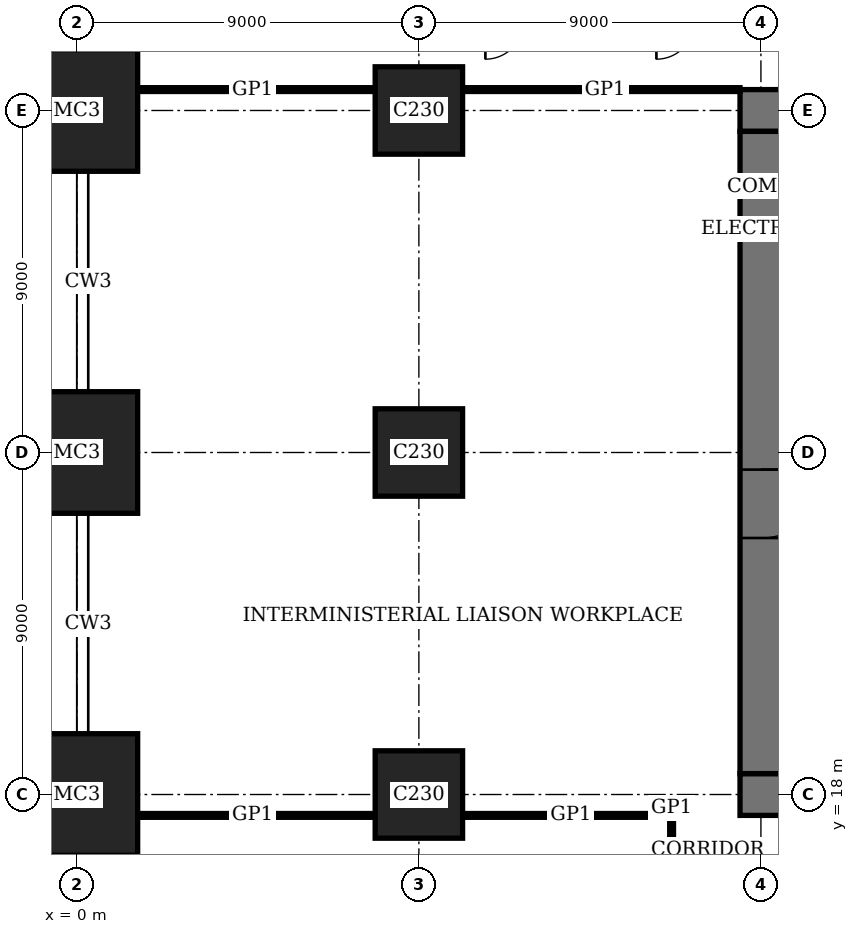
"""IFC4 building model, lengths in metres.
Left out: names, types, materials, properties, quantities, classifications, styles, units other than length and angle.
Written with IfcOpenShell. Run it as: python <this file> out.ifc"""

import sys

from ifc_helpers import new_model, si_unit, direction, frame, frame_2d, origin, origin_2d, place, context, subcontext, project, spatial, rectangle, extrude, element, fill, save


model = new_model("IFC4")
c1 = context("Model", 3, precision=1e-05, world=origin(), true_north=direction((0.0, 1.0)))
c2 = subcontext(c1, "Body", "Model", "MODEL_VIEW")
j1 = project(units=[si_unit("LENGTHUNIT", "METRE"), si_unit("PLANEANGLEUNIT", "RADIAN")], contexts=[c1])
p1 = place(None, origin())
s1 = spatial("IfcSite", under=j1, at=p1, CompositionType="ELEMENT")
p2 = place(p1, origin())
s2 = spatial("IfcBuilding", under=s1, at=p2, CompositionType="ELEMENT")
p3 = place(p2, frame((0.0, 0.0, 85.0)))
s3 = spatial("IfcBuildingStorey", under=s2, at=p3, CompositionType="ELEMENT", Elevation=85.0)
for number, where, z_axis, x_axis in (
    (1, (0.0, 18.0, 0.0), (0.0, 0.0, 1.0), (1.0, 0.0, 0.0)),
    (2, (0.0, 27.0, 0.0), (0.0, 0.0, 1.0), (1.0, 0.0, 0.0)),
    (3, (0.0, 36.0, 0.0), (0.0, 0.0, 1.0), (1.0, 0.0, 0.0)),
):
    element("IfcColumn", number, at=place(p3, frame(where, z_axis=z_axis, x_axis=x_axis)), inside=s3, PredefinedType="COLUMN", context=c2, shape_type="SweptSolid", body=[
        extrude(rectangle(XDim=3.2, YDim=3.2, at=origin_2d()), origin(), (0.0, 0.0, 1.0), 4.0),
    ])
for number, where, z_axis, x_axis in (
    (4, (9.0, 18.0, 0.0), (0.0, 0.0, 1.0), (1.0, 0.0, 0.0)),
    (5, (9.0, 27.0, 0.0), (0.0, 0.0, 1.0), (1.0, 0.0, 0.0)),
    (6, (9.0, 36.0, 0.0), (0.0, 0.0, 1.0), (1.0, 0.0, 0.0)),
):
    element("IfcColumn", number, at=place(p3, frame(where, z_axis=z_axis, x_axis=x_axis)), inside=s3, PredefinedType="COLUMN", context=c2, shape_type="SweptSolid", body=[
        extrude(rectangle(XDim=2.3, YDim=2.3, at=origin_2d()), origin(), (0.0, 0.0, 1.0), 4.0),
    ])
p4 = place(p3, frame((17.45, 18.0, 0.0), z_axis=(0.0, 0.0, 1.0), x_axis=(1.0, 0.0, 0.0)))
e7 = element("IfcWall", 7, at=p4, inside=s3, PredefinedType="SHEAR", context=c2, shape_type="SweptSolid", body=[
    extrude(rectangle(XDim=28.1, YDim=1.1, at=frame_2d((14.05, 0.0))), origin(), (0.0, 0.0, 1.0), 4.0),
])
p5 = place(p4, frame((11.55, 0.0, 0.0)))
e8 = element("IfcOpeningElement", 8, at=p5, cuts=e7, PredefinedType="OPENING", context=c2, shape_type="SweptSolid", body=[
    extrude(rectangle(XDim=1.0, YDim=2.4, at=frame_2d((0.5, 1.2))), frame((0.0, 0.56, 0.0), z_axis=(0.0, -1.0, 0.0), x_axis=(1.0, 0.0, 0.0)), (0.0, 0.0, 1.0), 1.12),
])
p6 = place(p4, frame((16.55, 0.0, 0.0)))
e9 = element("IfcOpeningElement", 9, at=p6, cuts=e7, PredefinedType="OPENING", context=c2, shape_type="SweptSolid", body=[
    extrude(rectangle(XDim=1.0, YDim=2.4, at=frame_2d((0.5, 1.2))), frame((0.0, 0.56, 0.0), z_axis=(0.0, -1.0, 0.0), x_axis=(1.0, 0.0, 0.0)), (0.0, 0.0, 1.0), 1.12),
])
p7 = place(p4, frame((20.0, 0.0, 0.0)))
e10 = element("IfcOpeningElement", 10, at=p7, cuts=e7, PredefinedType="OPENING", context=c2, shape_type="SweptSolid", body=[
    extrude(rectangle(XDim=1.1, YDim=2.4, at=frame_2d((0.55, 1.2))), frame((0.0, 0.56, 0.0), z_axis=(0.0, -1.0, 0.0), x_axis=(1.0, 0.0, 0.0)), (0.0, 0.0, 1.0), 1.12),
])
p8 = place(p4, frame((24.05, 0.0, 0.0)))
e11 = element("IfcOpeningElement", 11, at=p8, cuts=e7, PredefinedType="OPENING", context=c2, shape_type="SweptSolid", body=[
    extrude(rectangle(XDim=1.0, YDim=2.4, at=frame_2d((0.5, 1.2))), frame((0.0, 0.56, 0.0), z_axis=(0.0, -1.0, 0.0), x_axis=(1.0, 0.0, 0.0)), (0.0, 0.0, 1.0), 1.12),
])
p9 = place(p3, frame((45.55, 36.0, 0.0), z_axis=(0.0, 0.0, 1.0), x_axis=(-1.0, 0.0, 0.0)))
e12 = element("IfcWall", 12, at=p9, inside=s3, PredefinedType="SHEAR", context=c2, shape_type="SweptSolid", body=[
    extrude(rectangle(XDim=28.1, YDim=1.1, at=frame_2d((14.05, 0.0))), origin(), (0.0, 0.0, 1.0), 4.0),
])
p10 = place(p9, frame((11.55, 0.0, 0.0)))
e13 = element("IfcOpeningElement", 13, at=p10, cuts=e12, PredefinedType="OPENING", context=c2, shape_type="SweptSolid", body=[
    extrude(rectangle(XDim=1.0, YDim=2.4, at=frame_2d((0.5, 1.2))), frame((0.0, 0.56, 0.0), z_axis=(0.0, -1.0, 0.0), x_axis=(1.0, 0.0, 0.0)), (0.0, 0.0, 1.0), 1.12),
])
p11 = place(p9, frame((16.55, 0.0, 0.0)))
e14 = element("IfcOpeningElement", 14, at=p11, cuts=e12, PredefinedType="OPENING", context=c2, shape_type="SweptSolid", body=[
    extrude(rectangle(XDim=1.0, YDim=2.4, at=frame_2d((0.5, 1.2))), frame((0.0, 0.56, 0.0), z_axis=(0.0, -1.0, 0.0), x_axis=(1.0, 0.0, 0.0)), (0.0, 0.0, 1.0), 1.12),
])
p12 = place(p9, frame((20.0, 0.0, 0.0)))
e15 = element("IfcOpeningElement", 15, at=p12, cuts=e12, PredefinedType="OPENING", context=c2, shape_type="SweptSolid", body=[
    extrude(rectangle(XDim=1.1, YDim=2.4, at=frame_2d((0.55, 1.2))), frame((0.0, 0.56, 0.0), z_axis=(0.0, -1.0, 0.0), x_axis=(1.0, 0.0, 0.0)), (0.0, 0.0, 1.0), 1.12),
])
p13 = place(p9, frame((24.05, 0.0, 0.0)))
e16 = element("IfcOpeningElement", 16, at=p13, cuts=e12, PredefinedType="OPENING", context=c2, shape_type="SweptSolid", body=[
    extrude(rectangle(XDim=1.0, YDim=2.4, at=frame_2d((0.5, 1.2))), frame((0.0, 0.56, 0.0), z_axis=(0.0, -1.0, 0.0), x_axis=(1.0, 0.0, 0.0)), (0.0, 0.0, 1.0), 1.12),
])
p14 = place(p3, frame((18.0, 35.45, 0.0), z_axis=(0.0, 0.0, 1.0), x_axis=(0.0, -1.0, 0.0)))
e17 = element("IfcWall", 17, at=p14, inside=s3, PredefinedType="SHEAR", context=c2, shape_type="SweptSolid", body=[
    extrude(rectangle(XDim=16.9, YDim=1.1, at=frame_2d((8.45, 0.0))), origin(), (0.0, 0.0, 1.0), 4.0),
])
p15 = place(p14, frame((8.9, 0.0, 0.0)))
e18 = element("IfcOpeningElement", 18, at=p15, cuts=e17, PredefinedType="OPENING", context=c2, shape_type="SweptSolid", body=[
    extrude(rectangle(XDim=1.8, YDim=2.4, at=frame_2d((0.9, 1.2))), frame((0.0, 0.56, 0.0), z_axis=(0.0, -1.0, 0.0), x_axis=(1.0, 0.0, 0.0)), (0.0, 0.0, 1.0), 1.12),
])
p16 = place(p3, frame((1.6, 17.45, 0.0), z_axis=(0.0, 0.0, 1.0), x_axis=(1.0, 0.0, 0.0)))
e19 = element("IfcWall", 19, at=p16, inside=s3, PredefinedType="PARTITIONING", context=c2, shape_type="SweptSolid", body=[
    extrude(rectangle(XDim=6.25, YDim=0.1, at=frame_2d((3.125, 0.0))), origin(), (0.0, 0.0, 1.0), 3.75),
])
p17 = place(p3, frame((10.15, 17.45, 0.0), z_axis=(0.0, 0.0, 1.0), x_axis=(1.0, 0.0, 0.0)))
e20 = element("IfcWall", 20, at=p17, inside=s3, PredefinedType="PARTITIONING", context=c2, shape_type="SweptSolid", body=[
    extrude(rectangle(XDim=5.5, YDim=0.1, at=frame_2d((2.75, 0.0))), origin(), (0.0, 0.0, 1.0), 3.75),
])
p18 = place(p3, frame((1.6, 36.55, 0.0), z_axis=(0.0, 0.0, 1.0), x_axis=(1.0, 0.0, 0.0)))
e21 = element("IfcWall", 21, at=p18, inside=s3, PredefinedType="PARTITIONING", context=c2, shape_type="SweptSolid", body=[
    extrude(rectangle(XDim=6.25, YDim=0.1, at=frame_2d((3.125, 0.0))), origin(), (0.0, 0.0, 1.0), 3.75),
])
p19 = place(p3, frame((10.15, 36.55, 0.0), z_axis=(0.0, 0.0, 1.0), x_axis=(1.0, 0.0, 0.0)))
e22 = element("IfcWall", 22, at=p19, inside=s3, PredefinedType="PARTITIONING", context=c2, shape_type="SweptSolid", body=[
    extrude(rectangle(XDim=7.3, YDim=0.1, at=frame_2d((3.65, 0.0))), origin(), (0.0, 0.0, 1.0), 3.75),
])
p20 = place(p3, frame((15.65, 15.65, 0.0), z_axis=(0.0, 0.0, 1.0), x_axis=(0.0, 1.0, 0.0)))
e23 = element("IfcWall", 23, at=p20, inside=s3, PredefinedType="PARTITIONING", context=c2, shape_type="SweptSolid", body=[
    extrude(rectangle(XDim=1.8, YDim=0.1, at=frame_2d((0.9, 0.0))), origin(), (0.0, 0.0, 1.0), 3.75),
])
p21 = place(p15, origin())
e24 = element("IfcDoor", 24, at=p21, inside=s3, OperationType="DOUBLE_DOOR_DOUBLE_SWING", PredefinedType="DOOR", context=c2, shape_type="SweptSolid", body=[
    extrude(rectangle(XDim=1.8, YDim=2.4, at=frame_2d((0.9, 1.2))), frame((0.0, 0.03, 0.0), z_axis=(0.0, -1.0, 0.0), x_axis=(1.0, 0.0, 0.0)), (0.0, 0.0, 1.0), 0.06),
    extrude(rectangle(XDim=0.04, YDim=2.4, at=frame_2d((0.02, 1.2))), frame((0.0, 0.55, 0.0), z_axis=(0.0, -1.0, 0.0), x_axis=(1.0, 0.0, 0.0)), (0.0, 0.0, 1.0), 1.1),
    extrude(rectangle(XDim=0.04, YDim=2.4, at=frame_2d((1.78, 1.2))), frame((0.0, 0.55, 0.0), z_axis=(0.0, -1.0, 0.0), x_axis=(1.0, 0.0, 0.0)), (0.0, 0.0, 1.0), 1.1),
    extrude(rectangle(XDim=1.8, YDim=0.04, at=frame_2d((0.9, 2.38))), frame((0.0, 0.55, 0.0), z_axis=(0.0, -1.0, 0.0), x_axis=(1.0, 0.0, 0.0)), (0.0, 0.0, 1.0), 1.1),
])
fill(e18, e24)
save(model, sys.argv[1])
